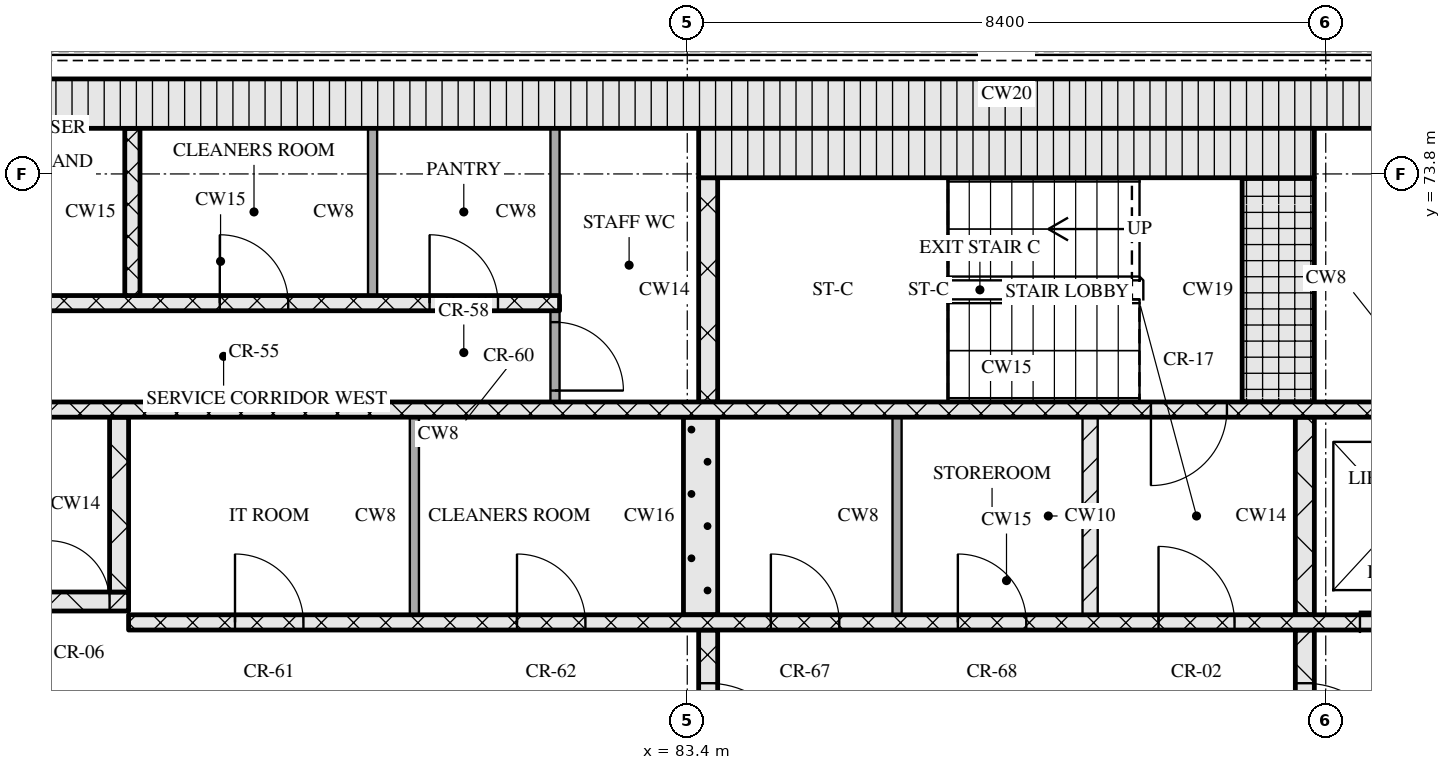
"""IFC4 building model, lengths in metres.
Left out: names, types, materials, properties, quantities, classifications, styles, units other than length and angle.
Written with IfcOpenShell. Run it as: python <this file> out.ifc"""

import sys

from ifc_helpers import new_model, si_unit, direction, frame, frame_2d, origin, place, context, subcontext, project, spatial, rectangle, extrude, element, fill, save


model = new_model("IFC4")
c1 = context("Model", 3, precision=1e-05, world=origin(), true_north=direction((0.0, 1.0)))
c2 = subcontext(c1, "Body", "Model", "MODEL_VIEW")
j1 = project(units=[si_unit("LENGTHUNIT", "METRE"), si_unit("PLANEANGLEUNIT", "RADIAN")], contexts=[c1])
p1 = place(None, origin())
s1 = spatial("IfcSite", under=j1, at=p1, CompositionType="ELEMENT")
p2 = place(p1, origin())
s2 = spatial("IfcBuilding", under=s1, at=p2, CompositionType="ELEMENT")
p3 = place(p2, frame((0.0, 0.0, 212.7)))
s3 = spatial("IfcBuildingStorey", under=s2, at=p3, CompositionType="ELEMENT", Elevation=212.7)
p4 = place(p3, frame((67.15, 74.725, 0.0), z_axis=(0.0, 0.0, 1.0), x_axis=(1.0, 0.0, 0.0)))
e1 = element("IfcWall", 1, at=p4, inside=s3, PredefinedType="SOLIDWALL", context=c2, shape_type="SweptSolid", body=[
    extrude(rectangle(XDim=40.9, YDim=0.65, at=frame_2d((20.45, 0.0))), origin(), (0.0, 0.0, 1.0), 3.32),
])
p5 = place(p3, frame((83.675, 65.2, 0.0), z_axis=(0.0, 0.0, 1.0), x_axis=(0.0, 1.0, 0.0)))
e2 = element("IfcWall", 2, at=p5, inside=s3, PredefinedType="SOLIDWALL", context=c2, shape_type="SweptSolid", body=[
    extrude(rectangle(XDim=2.6, YDim=0.25, at=frame_2d((1.3, 0.0))), origin(), (0.0, 0.0, 1.0), 3.32),
])
p6 = place(p5, frame((0.7, 0.0, 0.0)))
e3 = element("IfcOpeningElement", 3, at=p6, cuts=e2, PredefinedType="OPENING", context=c2, shape_type="SweptSolid", body=[
    extrude(rectangle(XDim=1.2, YDim=2.1, at=frame_2d((0.6, 1.05))), frame((0.0, 0.135, 0.0), z_axis=(0.0, -1.0, 0.0), x_axis=(1.0, 0.0, 0.0)), (0.0, 0.0, 1.0), 0.27),
])
p7 = place(p3, frame((91.525, 65.2, 0.0), z_axis=(0.0, 0.0, 1.0), x_axis=(0.0, 1.0, 0.0)))
e4 = element("IfcWall", 4, at=p7, inside=s3, PredefinedType="SOLIDWALL", context=c2, shape_type="SweptSolid", body=[
    extrude(rectangle(XDim=2.6, YDim=0.25, at=frame_2d((1.3, 0.0))), origin(), (0.0, 0.0, 1.0), 3.32),
])
p8 = place(p7, frame((0.7, 0.0, 0.0)))
e5 = element("IfcOpeningElement", 5, at=p8, cuts=e4, PredefinedType="OPENING", context=c2, shape_type="SweptSolid", body=[
    extrude(rectangle(XDim=1.2, YDim=2.1, at=frame_2d((0.6, 1.05))), frame((0.0, 0.135, 0.0), z_axis=(0.0, -1.0, 0.0), x_axis=(1.0, 0.0, 0.0)), (0.0, 0.0, 1.0), 0.27),
])
p9 = place(p3, frame((76.05, 67.9, 0.0), z_axis=(0.0, 0.0, 1.0), x_axis=(1.0, 0.0, 0.0)))
e6 = element("IfcWall", 6, at=p9, inside=s3, PredefinedType="SOLIDWALL", context=c2, shape_type="SweptSolid", body=[
    extrude(rectangle(XDim=23.1, YDim=0.2, at=frame_2d((11.55, 0.0))), origin(), (0.0, 0.0, 1.0), 3.32),
])
p10 = place(p9, frame((1.4, 0.0, 0.0)))
e7 = element("IfcOpeningElement", 7, at=p10, cuts=e6, PredefinedType="OPENING", context=c2, shape_type="SweptSolid", body=[
    extrude(rectangle(XDim=0.9, YDim=2.1, at=frame_2d((0.45, 1.05))), frame((0.0, 0.11, 0.0), z_axis=(0.0, -1.0, 0.0), x_axis=(1.0, 0.0, 0.0)), (0.0, 0.0, 1.0), 0.22),
])
p11 = place(p9, frame((5.11, 0.0, 0.0)))
e8 = element("IfcOpeningElement", 8, at=p11, cuts=e6, PredefinedType="OPENING", context=c2, shape_type="SweptSolid", body=[
    extrude(rectangle(XDim=0.9, YDim=2.1, at=frame_2d((0.45, 1.05))), frame((0.0, 0.11, 0.0), z_axis=(0.0, -1.0, 0.0), x_axis=(1.0, 0.0, 0.0)), (0.0, 0.0, 1.0), 0.22),
])
p12 = place(p9, frame((8.45, 0.0, 0.0)))
e9 = element("IfcOpeningElement", 9, at=p12, cuts=e6, PredefinedType="OPENING", context=c2, shape_type="SweptSolid", body=[
    extrude(rectangle(XDim=0.9, YDim=2.1, at=frame_2d((0.45, 1.05))), frame((0.0, 0.11, 0.0), z_axis=(0.0, -1.0, 0.0), x_axis=(1.0, 0.0, 0.0)), (0.0, 0.0, 1.0), 0.22),
])
p13 = place(p9, frame((10.91, 0.0, 0.0)))
e10 = element("IfcOpeningElement", 10, at=p13, cuts=e6, PredefinedType="OPENING", context=c2, shape_type="SweptSolid", body=[
    extrude(rectangle(XDim=0.9, YDim=2.1, at=frame_2d((0.45, 1.05))), frame((0.0, 0.11, 0.0), z_axis=(0.0, -1.0, 0.0), x_axis=(1.0, 0.0, 0.0)), (0.0, 0.0, 1.0), 0.22),
])
p14 = place(p9, frame((13.55, 0.0, 0.0)))
e11 = element("IfcOpeningElement", 11, at=p14, cuts=e6, PredefinedType="OPENING", context=c2, shape_type="SweptSolid", body=[
    extrude(rectangle(XDim=1.0, YDim=2.1, at=frame_2d((0.5, 1.05))), frame((0.0, 0.11, 0.0), z_axis=(0.0, -1.0, 0.0), x_axis=(1.0, 0.0, 0.0)), (0.0, 0.0, 1.0), 0.22),
])
p15 = place(p9, frame((16.2, 0.0, 0.0)))
e12 = element("IfcOpeningElement", 12, at=p15, cuts=e6, PredefinedType="OPENING", context=c2, shape_type="SweptSolid", body=[
    extrude(rectangle(XDim=1.1, YDim=2.1, at=frame_2d((0.55, 1.05))), frame((0.0, 0.11, 0.0), z_axis=(0.0, -1.0, 0.0), x_axis=(1.0, 0.0, 0.0)), (0.0, 0.0, 1.0), 0.22),
])
p16 = place(p9, frame((18.7, 0.0, 0.0)))
e13 = element("IfcOpeningElement", 13, at=p16, cuts=e6, PredefinedType="OPENING", context=c2, shape_type="SweptSolid", body=[
    extrude(rectangle(XDim=1.1, YDim=2.1, at=frame_2d((0.55, 1.05))), frame((0.0, 0.11, 0.0), z_axis=(0.0, -1.0, 0.0), x_axis=(1.0, 0.0, 0.0)), (0.0, 0.0, 1.0), 0.22),
])
p17 = place(p9, frame((21.2, 0.0, 0.0)))
e14 = element("IfcOpeningElement", 14, at=p17, cuts=e6, PredefinedType="OPENING", context=c2, shape_type="SweptSolid", body=[
    extrude(rectangle(XDim=1.1, YDim=2.1, at=frame_2d((0.55, 1.05))), frame((0.0, 0.11, 0.0), z_axis=(0.0, -1.0, 0.0), x_axis=(1.0, 0.0, 0.0)), (0.0, 0.0, 1.0), 0.22),
])
p18 = place(p3, frame((79.81, 68.0, 0.0), z_axis=(0.0, 0.0, 1.0), x_axis=(0.0, 1.0, 0.0)))
e15 = element("IfcWall", 15, at=p18, inside=s3, PredefinedType="PARTITIONING", context=c2, shape_type="SweptSolid", body=[
    extrude(rectangle(XDim=2.6, YDim=0.12, at=frame_2d((1.3, 0.0))), origin(), (0.0, 0.0, 1.0), 3.32),
])
p19 = place(p3, frame((83.575, 68.0, 0.0), z_axis=(0.0, 0.0, 1.0), x_axis=(0.0, 1.0, 0.0)))
e16 = element("IfcWall", 16, at=p19, inside=s3, PredefinedType="SOLIDWALL", context=c2, shape_type="SweptSolid", body=[
    extrude(rectangle(XDim=2.6, YDim=0.45, at=frame_2d((1.3, 0.0))), origin(), (0.0, 0.0, 1.0), 3.32),
])
p20 = place(p3, frame((86.16, 68.0, 0.0), z_axis=(0.0, 0.0, 1.0), x_axis=(0.0, 1.0, 0.0)))
e17 = element("IfcWall", 17, at=p20, inside=s3, PredefinedType="PARTITIONING", context=c2, shape_type="SweptSolid", body=[
    extrude(rectangle(XDim=2.6, YDim=0.12, at=frame_2d((1.3, 0.0))), origin(), (0.0, 0.0, 1.0), 3.32),
])
p21 = place(p3, frame((88.7, 68.0, 0.0), z_axis=(0.0, 0.0, 1.0), x_axis=(0.0, 1.0, 0.0)))
e18 = element("IfcWall", 18, at=p21, inside=s3, PredefinedType="PARTITIONING", context=c2, shape_type="SweptSolid", body=[
    extrude(rectangle(XDim=2.6, YDim=0.2, at=frame_2d((1.3, 0.0))), origin(), (0.0, 0.0, 1.0), 3.32),
])
p22 = place(p3, frame((91.525, 68.0, 0.0), z_axis=(0.0, 0.0, 1.0), x_axis=(0.0, 1.0, 0.0)))
e19 = element("IfcWall", 19, at=p22, inside=s3, PredefinedType="SOLIDWALL", context=c2, shape_type="SweptSolid", body=[
    extrude(rectangle(XDim=2.6, YDim=0.25, at=frame_2d((1.3, 0.0))), origin(), (0.0, 0.0, 1.0), 3.32),
])
p23 = place(p3, frame((67.8, 68.175, 0.0), z_axis=(0.0, 0.0, 1.0), x_axis=(1.0, 0.0, 0.0)))
e20 = element("IfcWall", 20, at=p23, inside=s3, PredefinedType="SOLIDWALL", context=c2, shape_type="SweptSolid", body=[
    extrude(rectangle(XDim=8.25, YDim=0.25, at=frame_2d((4.125, 0.0))), origin(), (0.0, 0.0, 1.0), 3.32),
])
p24 = place(p23, frame((5.7, 0.0, 0.0)))
e21 = element("IfcOpeningElement", 21, at=p24, cuts=e20, PredefinedType="OPENING", context=c2, shape_type="SweptSolid", body=[
    extrude(rectangle(XDim=1.0, YDim=2.1, at=frame_2d((0.5, 1.05))), frame((0.0, 0.135, 0.0), z_axis=(0.0, -1.0, 0.0), x_axis=(1.0, 0.0, 0.0)), (0.0, 0.0, 1.0), 0.27),
])
p25 = place(p23, frame((7.2, 0.0, 0.0)))
e22 = element("IfcOpeningElement", 22, at=p25, cuts=e20, PredefinedType="OPENING", context=c2, shape_type="SweptSolid", body=[
    extrude(rectangle(XDim=0.8, YDim=2.1, at=frame_2d((0.4, 1.05))), frame((0.0, 0.135, 0.0), z_axis=(0.0, -1.0, 0.0), x_axis=(1.0, 0.0, 0.0)), (0.0, 0.0, 1.0), 0.27),
])
p26 = place(p3, frame((75.925, 68.3, 0.0), z_axis=(0.0, 0.0, 1.0), x_axis=(0.0, 1.0, 0.0)))
e23 = element("IfcWall", 23, at=p26, inside=s3, PredefinedType="SOLIDWALL", context=c2, shape_type="SweptSolid", body=[
    extrude(rectangle(XDim=2.3, YDim=0.25, at=frame_2d((1.15, 0.0))), origin(), (0.0, 0.0, 1.0), 3.32),
])
p27 = place(p3, frame((67.8, 70.7, 0.0), z_axis=(0.0, 0.0, 1.0), x_axis=(1.0, 0.0, 0.0)))
e24 = element("IfcWall", 24, at=p27, inside=s3, PredefinedType="SOLIDWALL", context=c2, shape_type="SweptSolid", body=[
    extrude(rectangle(XDim=39.6, YDim=0.2, at=frame_2d((19.8, 0.0))), origin(), (0.0, 0.0, 1.0), 3.32),
])
p28 = place(p27, frame((0.65, 0.0, 0.0)))
e25 = element("IfcOpeningElement", 25, at=p28, cuts=e24, PredefinedType="OPENING", context=c2, shape_type="SweptSolid", body=[
    extrude(rectangle(XDim=1.1, YDim=2.1, at=frame_2d((0.55, 1.05))), frame((0.0, 0.11, 0.0), z_axis=(0.0, -1.0, 0.0), x_axis=(1.0, 0.0, 0.0)), (0.0, 0.0, 1.0), 0.22),
])
p29 = place(p27, frame((3.25, 0.0, 0.0)))
e26 = element("IfcOpeningElement", 26, at=p29, cuts=e24, PredefinedType="OPENING", context=c2, shape_type="SweptSolid", body=[
    extrude(rectangle(XDim=1.1, YDim=2.1, at=frame_2d((0.55, 1.05))), frame((0.0, 0.11, 0.0), z_axis=(0.0, -1.0, 0.0), x_axis=(1.0, 0.0, 0.0)), (0.0, 0.0, 1.0), 0.22),
])
p30 = place(p27, frame((5.9, 0.0, 0.0)))
e27 = element("IfcOpeningElement", 27, at=p30, cuts=e24, PredefinedType="OPENING", context=c2, shape_type="SweptSolid", body=[
    extrude(rectangle(XDim=1.0, YDim=2.1, at=frame_2d((0.5, 1.05))), frame((0.0, 0.11, 0.0), z_axis=(0.0, -1.0, 0.0), x_axis=(1.0, 0.0, 0.0)), (0.0, 0.0, 1.0), 0.22),
])
p31 = place(p27, frame((21.7, 0.0, 0.0)))
e28 = element("IfcOpeningElement", 28, at=p31, cuts=e24, PredefinedType="OPENING", context=c2, shape_type="SweptSolid", body=[
    extrude(rectangle(XDim=1.0, YDim=2.1, at=frame_2d((0.5, 1.05))), frame((0.0, 0.11, 0.0), z_axis=(0.0, -1.0, 0.0), x_axis=(1.0, 0.0, 0.0)), (0.0, 0.0, 1.0), 0.22),
])
p32 = place(p27, frame((32.7, 0.0, 0.0)))
e29 = element("IfcOpeningElement", 29, at=p32, cuts=e24, PredefinedType="OPENING", context=c2, shape_type="SweptSolid", body=[
    extrude(rectangle(XDim=1.0, YDim=2.1, at=frame_2d((0.5, 1.05))), frame((0.0, 0.11, 0.0), z_axis=(0.0, -1.0, 0.0), x_axis=(1.0, 0.0, 0.0)), (0.0, 0.0, 1.0), 0.22),
])
p33 = place(p27, frame((35.25, 0.0, 0.0)))
e30 = element("IfcOpeningElement", 30, at=p33, cuts=e24, PredefinedType="OPENING", context=c2, shape_type="SweptSolid", body=[
    extrude(rectangle(XDim=1.1, YDim=2.1, at=frame_2d((0.55, 1.05))), frame((0.0, 0.11, 0.0), z_axis=(0.0, -1.0, 0.0), x_axis=(1.0, 0.0, 0.0)), (0.0, 0.0, 1.0), 0.22),
])
p34 = place(p27, frame((37.85, 0.0, 0.0)))
e31 = element("IfcOpeningElement", 31, at=p34, cuts=e24, PredefinedType="OPENING", context=c2, shape_type="SweptSolid", body=[
    extrude(rectangle(XDim=1.1, YDim=2.1, at=frame_2d((0.55, 1.05))), frame((0.0, 0.11, 0.0), z_axis=(0.0, -1.0, 0.0), x_axis=(1.0, 0.0, 0.0)), (0.0, 0.0, 1.0), 0.22),
])
p35 = place(p3, frame((81.66, 70.8, 0.0), z_axis=(0.0, 0.0, 1.0), x_axis=(0.0, 1.0, 0.0)))
e32 = element("IfcWall", 32, at=p35, inside=s3, PredefinedType="PARTITIONING", context=c2, shape_type="SweptSolid", body=[
    extrude(rectangle(XDim=1.2, YDim=0.12, at=frame_2d((0.6, 0.0))), origin(), (0.0, 0.0, 1.0), 3.32),
])
p36 = place(p35, frame((0.15, 0.0, 0.0)))
e33 = element("IfcOpeningElement", 33, at=p36, cuts=e32, PredefinedType="OPENING", context=c2, shape_type="SweptSolid", body=[
    extrude(rectangle(XDim=0.9, YDim=2.1, at=frame_2d((0.45, 1.05))), frame((0.0, 0.07, 0.0), z_axis=(0.0, -1.0, 0.0), x_axis=(1.0, 0.0, 0.0)), (0.0, 0.0, 1.0), 0.14),
])
p37 = place(p3, frame((83.675, 70.8, 0.0), z_axis=(0.0, 0.0, 1.0), x_axis=(0.0, 1.0, 0.0)))
e34 = element("IfcWall", 34, at=p37, inside=s3, PredefinedType="SOLIDWALL", context=c2, shape_type="SweptSolid", body=[
    extrude(rectangle(XDim=2.95, YDim=0.25, at=frame_2d((1.475, 0.0))), origin(), (0.0, 0.0, 1.0), 3.32),
])
p38 = place(p3, frame((91.175, 70.8, 0.0), z_axis=(0.0, 0.0, 1.0), x_axis=(0.0, 1.0, 0.0)))
e35 = element("IfcWall", 35, at=p38, inside=s3, PredefinedType="SOLIDWALL", context=c2, shape_type="SweptSolid", body=[
    extrude(rectangle(XDim=2.95, YDim=0.95, at=frame_2d((1.475, 0.0))), origin(), (0.0, 0.0, 1.0), 3.32),
])
p39 = place(p3, frame((72.8, 72.1, 0.0), z_axis=(0.0, 0.0, 1.0), x_axis=(1.0, 0.0, 0.0)))
e36 = element("IfcWall", 36, at=p39, inside=s3, PredefinedType="SOLIDWALL", context=c2, shape_type="SweptSolid", body=[
    extrude(rectangle(XDim=8.92, YDim=0.2, at=frame_2d((4.46, 0.0))), origin(), (0.0, 0.0, 1.0), 3.32),
])
p40 = place(p39, frame((1.25, 0.0, 0.0)))
e37 = element("IfcOpeningElement", 37, at=p40, cuts=e36, PredefinedType="OPENING", context=c2, shape_type="SweptSolid", body=[
    extrude(rectangle(XDim=0.9, YDim=2.1, at=frame_2d((0.45, 1.05))), frame((0.0, 0.11, 0.0), z_axis=(0.0, -1.0, 0.0), x_axis=(1.0, 0.0, 0.0)), (0.0, 0.0, 1.0), 0.22),
])
p41 = place(p39, frame((4.45, 0.0, 0.0)))
e38 = element("IfcOpeningElement", 38, at=p41, cuts=e36, PredefinedType="OPENING", context=c2, shape_type="SweptSolid", body=[
    extrude(rectangle(XDim=0.9, YDim=2.1, at=frame_2d((0.45, 1.05))), frame((0.0, 0.11, 0.0), z_axis=(0.0, -1.0, 0.0), x_axis=(1.0, 0.0, 0.0)), (0.0, 0.0, 1.0), 0.22),
])
p42 = place(p39, frame((7.21, 0.0, 0.0)))
e39 = element("IfcOpeningElement", 39, at=p42, cuts=e36, PredefinedType="OPENING", context=c2, shape_type="SweptSolid", body=[
    extrude(rectangle(XDim=0.9, YDim=2.1, at=frame_2d((0.45, 1.05))), frame((0.0, 0.11, 0.0), z_axis=(0.0, -1.0, 0.0), x_axis=(1.0, 0.0, 0.0)), (0.0, 0.0, 1.0), 0.22),
])
p43 = place(p3, frame((76.1, 72.2, 0.0), z_axis=(0.0, 0.0, 1.0), x_axis=(0.0, 1.0, 0.0)))
e40 = element("IfcWall", 40, at=p43, inside=s3, PredefinedType="SOLIDWALL", context=c2, shape_type="SweptSolid", body=[
    extrude(rectangle(XDim=2.2, YDim=0.2, at=frame_2d((1.1, 0.0))), origin(), (0.0, 0.0, 1.0), 3.32),
])
for number, where, z_axis, x_axis in (
    (41, (79.26, 72.2, 0.0), (0.0, 0.0, 1.0), (0.0, 1.0, 0.0)),
    (42, (81.66, 72.2, 0.0), (0.0, 0.0, 1.0), (0.0, 1.0, 0.0)),
):
    element("IfcWall", number, at=place(p3, frame(where, z_axis=z_axis, x_axis=x_axis)), inside=s3, PredefinedType="PARTITIONING", context=c2, shape_type="SweptSolid", body=[
        extrude(rectangle(XDim=2.2, YDim=0.12, at=frame_2d((1.1, 0.0))), origin(), (0.0, 0.0, 1.0), 3.32),
    ])
p44 = place(p3, frame((83.55, 74.075, 0.0), z_axis=(0.0, 0.0, 1.0), x_axis=(1.0, 0.0, 0.0)))
e43 = element("IfcWall", 43, at=p44, inside=s3, PredefinedType="SOLIDWALL", context=c2, shape_type="SweptSolid", body=[
    extrude(rectangle(XDim=8.1, YDim=0.65, at=frame_2d((4.05, 0.0))), origin(), (0.0, 0.0, 1.0), 3.32),
])
p45 = place(p6, origin())
e44 = element("IfcDoor", 44, at=p45, inside=s3, OperationType="SINGLE_SWING_RIGHT", PredefinedType="DOOR", context=c2, shape_type="SweptSolid", body=[
    extrude(rectangle(XDim=1.2, YDim=2.1, at=frame_2d((0.6, 1.05))), frame((0.0, 0.025, 0.0), z_axis=(0.0, -1.0, 0.0), x_axis=(1.0, 0.0, 0.0)), (0.0, 0.0, 1.0), 0.05),
])
fill(e3, e44)
p46 = place(p8, origin())
e45 = element("IfcDoor", 45, at=p46, inside=s3, OperationType="SINGLE_SWING_RIGHT", PredefinedType="DOOR", context=c2, shape_type="SweptSolid", body=[
    extrude(rectangle(XDim=1.2, YDim=2.1, at=frame_2d((0.6, 1.05))), frame((0.0, 0.025, 0.0), z_axis=(0.0, -1.0, 0.0), x_axis=(1.0, 0.0, 0.0)), (0.0, 0.0, 1.0), 0.05),
])
fill(e5, e45)
p47 = place(p10, origin())
e46 = element("IfcDoor", 46, at=p47, inside=s3, OperationType="SINGLE_SWING_LEFT", PredefinedType="DOOR", context=c2, shape_type="SweptSolid", body=[
    extrude(rectangle(XDim=0.9, YDim=2.1, at=frame_2d((0.45, 1.05))), frame((0.0, 0.025, 0.0), z_axis=(0.0, -1.0, 0.0), x_axis=(1.0, 0.0, 0.0)), (0.0, 0.0, 1.0), 0.05),
])
fill(e7, e46)
p48 = place(p11, origin())
e47 = element("IfcDoor", 47, at=p48, inside=s3, OperationType="SINGLE_SWING_LEFT", PredefinedType="DOOR", context=c2, shape_type="SweptSolid", body=[
    extrude(rectangle(XDim=0.9, YDim=2.1, at=frame_2d((0.45, 1.05))), frame((0.0, 0.025, 0.0), z_axis=(0.0, -1.0, 0.0), x_axis=(1.0, 0.0, 0.0)), (0.0, 0.0, 1.0), 0.05),
])
fill(e8, e47)
p49 = place(p12, origin())
e48 = element("IfcDoor", 48, at=p49, inside=s3, OperationType="SINGLE_SWING_LEFT", PredefinedType="DOOR", context=c2, shape_type="SweptSolid", body=[
    extrude(rectangle(XDim=0.9, YDim=2.1, at=frame_2d((0.45, 1.05))), frame((0.0, 0.025, 0.0), z_axis=(0.0, -1.0, 0.0), x_axis=(1.0, 0.0, 0.0)), (0.0, 0.0, 1.0), 0.05),
])
fill(e9, e48)
p50 = place(p13, origin())
e49 = element("IfcDoor", 49, at=p50, inside=s3, OperationType="SINGLE_SWING_LEFT", PredefinedType="DOOR", context=c2, shape_type="SweptSolid", body=[
    extrude(rectangle(XDim=0.9, YDim=2.1, at=frame_2d((0.45, 1.05))), frame((0.0, 0.025, 0.0), z_axis=(0.0, -1.0, 0.0), x_axis=(1.0, 0.0, 0.0)), (0.0, 0.0, 1.0), 0.05),
])
fill(e10, e49)
p51 = place(p14, origin())
e50 = element("IfcDoor", 50, at=p51, inside=s3, OperationType="SINGLE_SWING_LEFT", PredefinedType="DOOR", context=c2, shape_type="SweptSolid", body=[
    extrude(rectangle(XDim=1.0, YDim=2.1, at=frame_2d((0.5, 1.05))), frame((0.0, 0.025, 0.0), z_axis=(0.0, -1.0, 0.0), x_axis=(1.0, 0.0, 0.0)), (0.0, 0.0, 1.0), 0.05),
])
fill(e11, e50)
p52 = place(p15, origin())
e51 = element("IfcDoor", 51, at=p52, inside=s3, OperationType="SLIDING_TO_RIGHT", PredefinedType="DOOR", context=c2, shape_type="SweptSolid", body=[
    extrude(rectangle(XDim=1.1, YDim=2.1, at=frame_2d((0.55, 1.05))), frame((0.0, 0.025, 0.0), z_axis=(0.0, -1.0, 0.0), x_axis=(1.0, 0.0, 0.0)), (0.0, 0.0, 1.0), 0.05),
])
fill(e12, e51)
p53 = place(p25, origin())
e52 = element("IfcDoor", 52, at=p53, inside=s3, OperationType="SINGLE_SWING_LEFT", PredefinedType="DOOR", context=c2, shape_type="SweptSolid", body=[
    extrude(rectangle(XDim=0.8, YDim=2.1, at=frame_2d((0.4, 1.05))), frame((0.0, 0.025, 0.0), z_axis=(0.0, -1.0, 0.0), x_axis=(1.0, 0.0, 0.0)), (0.0, 0.0, 1.0), 0.05),
])
fill(e22, e52)
p54 = place(p31, origin())
e53 = element("IfcDoor", 53, at=p54, inside=s3, OperationType="SINGLE_SWING_RIGHT", PredefinedType="DOOR", context=c2, shape_type="SweptSolid", body=[
    extrude(rectangle(XDim=1.0, YDim=2.1, at=frame_2d((0.5, 1.05))), frame((0.0, 0.025, 0.0), z_axis=(0.0, -1.0, 0.0), x_axis=(1.0, 0.0, 0.0)), (0.0, 0.0, 1.0), 0.05),
])
fill(e28, e53)
p55 = place(p36, origin())
e54 = element("IfcDoor", 54, at=p55, inside=s3, OperationType="SINGLE_SWING_RIGHT", PredefinedType="DOOR", context=c2, shape_type="SweptSolid", body=[
    extrude(rectangle(XDim=0.9, YDim=2.1, at=frame_2d((0.45, 1.05))), frame((0.0, 0.025, 0.0), z_axis=(0.0, -1.0, 0.0), x_axis=(1.0, 0.0, 0.0)), (0.0, 0.0, 1.0), 0.05),
])
fill(e33, e54)
p56 = place(p41, origin())
e55 = element("IfcDoor", 55, at=p56, inside=s3, OperationType="SINGLE_SWING_LEFT", PredefinedType="DOOR", context=c2, shape_type="SweptSolid", body=[
    extrude(rectangle(XDim=0.9, YDim=2.1, at=frame_2d((0.45, 1.05))), frame((0.0, 0.025, 0.0), z_axis=(0.0, -1.0, 0.0), x_axis=(1.0, 0.0, 0.0)), (0.0, 0.0, 1.0), 0.05),
])
fill(e38, e55)
p57 = place(p42, origin())
e56 = element("IfcDoor", 56, at=p57, inside=s3, OperationType="SINGLE_SWING_LEFT", PredefinedType="DOOR", context=c2, shape_type="SweptSolid", body=[
    extrude(rectangle(XDim=0.9, YDim=2.1, at=frame_2d((0.45, 1.05))), frame((0.0, 0.025, 0.0), z_axis=(0.0, -1.0, 0.0), x_axis=(1.0, 0.0, 0.0)), (0.0, 0.0, 1.0), 0.05),
])
fill(e39, e56)
save(model, sys.argv[1])
